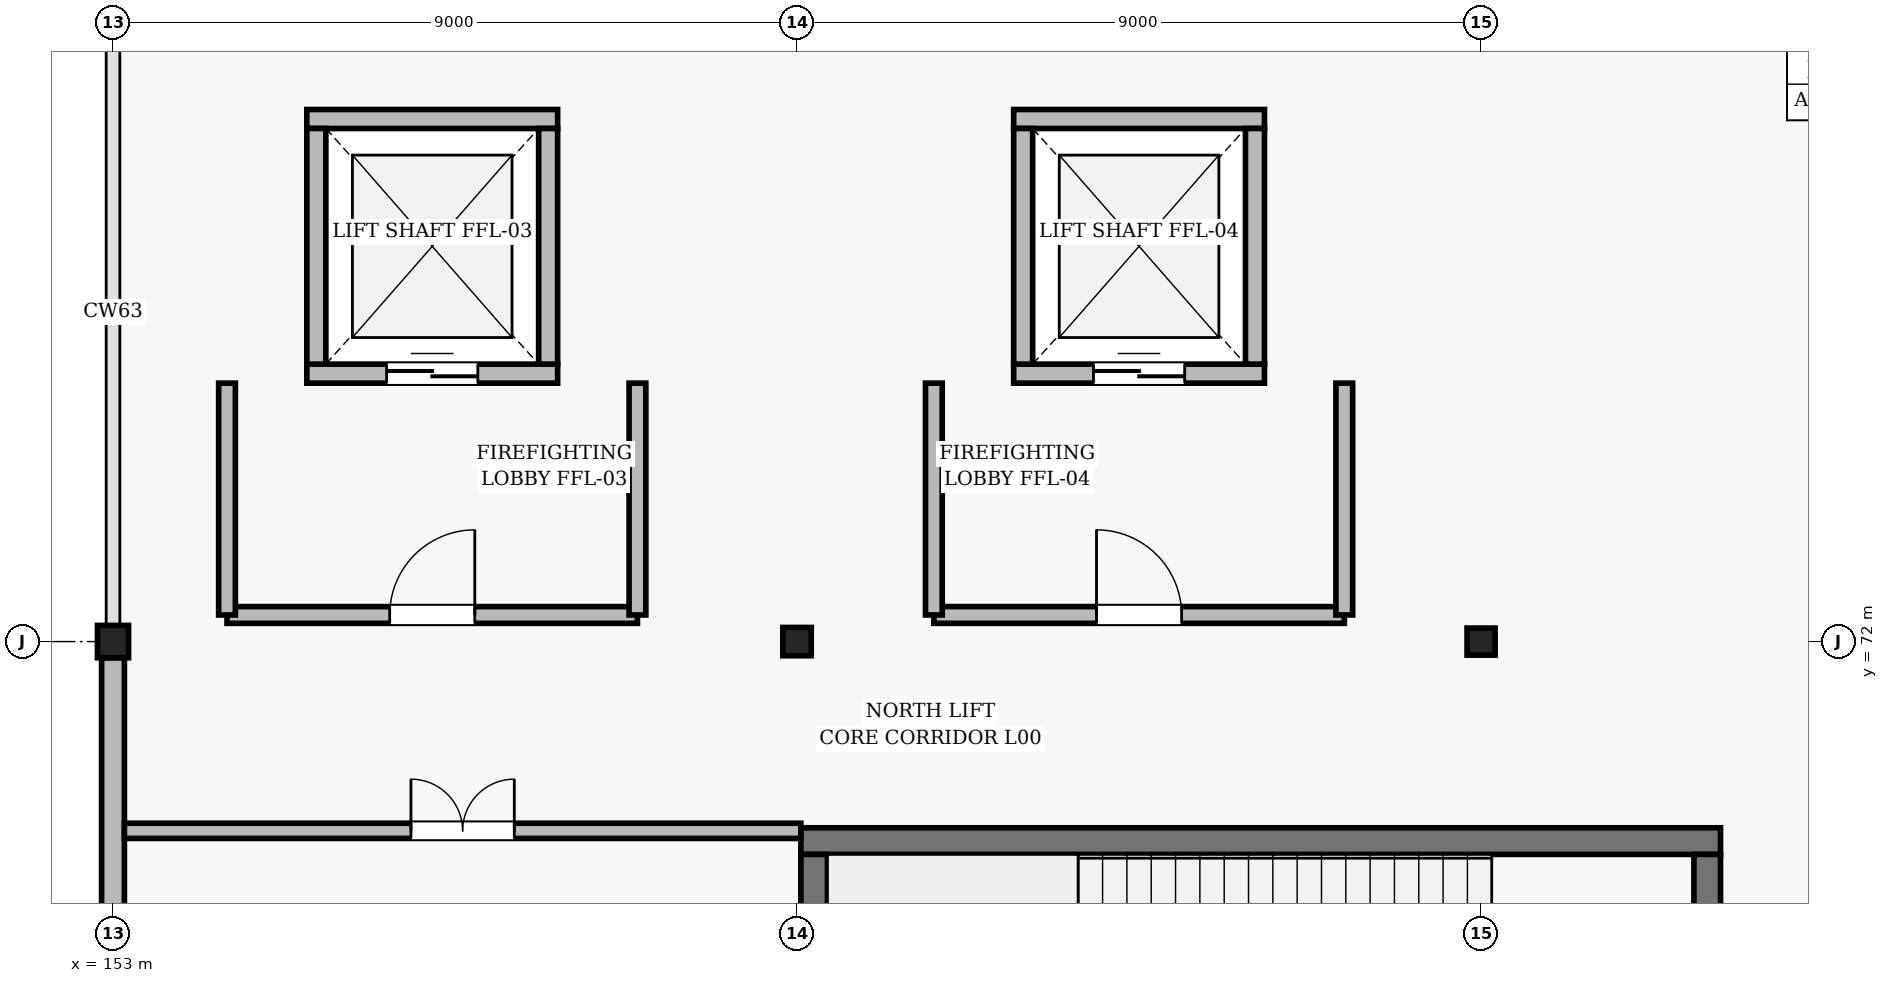
"""IFC4 building model, lengths in metres.
Left out: names, types, materials, properties, quantities, classifications, styles, units other than length and angle.
Written with IfcOpenShell. Run it as: python <this file> out.ifc"""

import sys

from ifc_helpers import new_model, si_unit, direction, frame, frame_2d, origin, origin_2d, place, context, subcontext, project, spatial, rectangle, i_section, extrude, element, fill, save


model = new_model("IFC4")
c1 = context("Model", 3, precision=1e-05, world=origin(), true_north=direction((0.0, 1.0)))
c2 = subcontext(c1, "Body", "Model", "MODEL_VIEW")
j1 = project(units=[si_unit("LENGTHUNIT", "METRE"), si_unit("PLANEANGLEUNIT", "RADIAN")], contexts=[c1])
p1 = place(None, origin())
s1 = spatial("IfcSite", under=j1, at=p1, CompositionType="ELEMENT")
p2 = place(p1, origin())
s2 = spatial("IfcBuilding", under=s1, at=p2, CompositionType="ELEMENT")
p3 = place(p2, origin())
s3 = spatial("IfcBuildingStorey", under=s2, at=p3, CompositionType="ELEMENT", Elevation=0.0)
p4 = place(p3, frame((153.0, 72.0, 0.0), z_axis=(0.0, 0.0, 1.0), x_axis=(1.0, 0.0, 0.0)))
e1 = element("IfcColumn", 1, at=p4, inside=s3, PredefinedType="COLUMN", context=c2, shape_type="SweptSolid", body=[
    extrude(i_section(OverallWidth=0.409, OverallDepth=0.425, WebThickness=0.031, FlangeThickness=0.049, FilletRadius=0.02, at=origin_2d()), origin(), (0.0, 0.0, 1.0), 5.4),
])
p5 = place(p3, frame((162.0, 72.0, 0.0), z_axis=(0.0, 0.0, 1.0), x_axis=(1.0, 0.0, 0.0)))
e2 = element("IfcColumn", 2, at=p5, inside=s3, PredefinedType="COLUMN", context=c2, shape_type="SweptSolid", body=[
    extrude(i_section(OverallWidth=0.374, OverallDepth=0.372, WebThickness=0.016, FlangeThickness=0.026, FilletRadius=0.016, at=origin_2d()), origin(), (0.0, 0.0, 1.0), 5.4),
])
p6 = place(p3, frame((171.0, 72.0, 0.0), z_axis=(0.0, 0.0, 1.0), x_axis=(1.0, 0.0, 0.0)))
e3 = element("IfcColumn", 3, at=p6, inside=s3, PredefinedType="COLUMN", context=c2, shape_type="SweptSolid", body=[
    extrude(i_section(OverallWidth=0.369, OverallDepth=0.356, WebThickness=0.011, FlangeThickness=0.018, FilletRadius=0.015, at=origin_2d()), origin(), (0.0, 0.0, 1.0), 5.4),
])
p7 = place(p3, frame((153.0, 63.347, 0.0), z_axis=(0.0, 0.0, 1.0), x_axis=(0.0, 1.0, 0.0)))
e4 = element("IfcWall", 4, at=p7, inside=s3, PredefinedType="SOLIDWALL", context=c2, shape_type="SweptSolid", body=[
    extrude(rectangle(XDim=8.44, YDim=0.3, at=frame_2d((4.22, 0.0))), origin(), (0.0, 0.0, 1.0), 4.47),
])
p8 = place(p3, frame((174.15, 69.375, 0.0), z_axis=(0.0, 0.0, 1.0), x_axis=(-1.0, 0.0, 0.0)))
e5 = element("IfcWall", 5, at=p8, inside=s3, PredefinedType="SHEAR", context=c2, shape_type="SweptSolid", body=[
    extrude(rectangle(XDim=12.1, YDim=0.35, at=frame_2d((6.05, 0.0))), origin(), (0.0, 0.0, 1.0), 5.18),
])
p9 = place(p3, frame((162.225, 69.2, 0.0), z_axis=(0.0, 0.0, 1.0), x_axis=(0.0, -1.0, 0.0)))
e6 = element("IfcWall", 6, at=p9, inside=s3, PredefinedType="SHEAR", context=c2, shape_type="SweptSolid", body=[
    extrude(rectangle(XDim=5.5, YDim=0.35, at=frame_2d((2.75, 0.0))), origin(), (0.0, 0.0, 1.0), 5.18),
])
p10 = place(p3, frame((173.975, 63.7, 0.0), z_axis=(0.0, 0.0, 1.0), x_axis=(0.0, 1.0, 0.0)))
e7 = element("IfcWall", 7, at=p10, inside=s3, PredefinedType="SHEAR", context=c2, shape_type="SweptSolid", body=[
    extrude(rectangle(XDim=5.5, YDim=0.35, at=frame_2d((2.75, 0.0))), origin(), (0.0, 0.0, 1.0), 5.18),
])
p11 = place(p10, frame((1.85, 0.0, 0.0)))
e8 = element("IfcOpeningElement", 8, at=p11, cuts=e7, PredefinedType="OPENING", context=c2, shape_type="SweptSolid", body=[
    extrude(rectangle(XDim=1.8, YDim=2.2, at=frame_2d((0.9, 1.1))), frame((0.0, 0.185, 0.0), z_axis=(0.0, -1.0, 0.0), x_axis=(1.0, 0.0, 0.0)), (0.0, 0.0, 1.0), 0.37),
])
p12 = place(p3, frame((155.55, 75.525, 0.0), z_axis=(0.0, 0.0, 1.0), x_axis=(1.0, 0.0, 0.0)))
e9 = element("IfcWall", 9, at=p12, inside=s3, PredefinedType="SOLIDWALL", context=c2, shape_type="SweptSolid", body=[
    extrude(rectangle(XDim=3.3, YDim=0.25, at=frame_2d((1.65, 0.0))), origin(), (0.0, 0.0, 1.0), 5.18),
])
p13 = place(p12, frame((1.05, 0.0, 0.0)))
e10 = element("IfcOpeningElement", 10, at=p13, cuts=e9, PredefinedType="OPENING", context=c2, shape_type="SweptSolid", body=[
    extrude(rectangle(XDim=1.2, YDim=2.25, at=frame_2d((0.6, 1.125))), frame((0.0, 0.135, 0.0), z_axis=(0.0, -1.0, 0.0), x_axis=(1.0, 0.0, 0.0)), (0.0, 0.0, 1.0), 0.27),
])
p14 = place(p3, frame((158.85, 78.875, 0.0), z_axis=(0.0, 0.0, 1.0), x_axis=(-1.0, 0.0, 0.0)))
e11 = element("IfcWall", 11, at=p14, inside=s3, PredefinedType="SOLIDWALL", context=c2, shape_type="SweptSolid", body=[
    extrude(rectangle(XDim=3.3, YDim=0.25, at=frame_2d((1.65, 0.0))), origin(), (0.0, 0.0, 1.0), 5.18),
])
for number, where, z_axis, x_axis in (
    (12, (155.675, 78.75, 0.0), (0.0, 0.0, 1.0), (0.0, -1.0, 0.0)),
    (13, (158.725, 75.65, 0.0), (0.0, 0.0, 1.0), (0.0, 1.0, 0.0)),
):
    element("IfcWall", number, at=place(p3, frame(where, z_axis=z_axis, x_axis=x_axis)), inside=s3, PredefinedType="SOLIDWALL", context=c2, shape_type="SweptSolid", body=[
        extrude(rectangle(XDim=3.1, YDim=0.25, at=frame_2d((1.55, 0.0))), origin(), (0.0, 0.0, 1.0), 5.18),
    ])
p15 = place(p3, frame((154.5, 72.35, 0.0), z_axis=(0.0, 0.0, 1.0), x_axis=(1.0, 0.0, 0.0)))
e14 = element("IfcWall", 14, at=p15, inside=s3, PredefinedType="SOLIDWALL", context=c2, shape_type="SweptSolid", body=[
    extrude(rectangle(XDim=5.4, YDim=0.22, at=frame_2d((2.7, 0.0))), origin(), (0.0, 0.0, 1.0), 4.47),
])
p16 = place(p15, frame((2.14, 0.0, 0.0)))
e15 = element("IfcOpeningElement", 15, at=p16, cuts=e14, PredefinedType="OPENING", context=c2, shape_type="SweptSolid", body=[
    extrude(rectangle(XDim=1.12, YDim=2.2, at=frame_2d((0.56, 1.1))), frame((0.0, 0.12, 0.0), z_axis=(0.0, -1.0, 0.0), x_axis=(1.0, 0.0, 0.0)), (0.0, 0.0, 1.0), 0.24),
])
for number, where, z_axis, x_axis in (
    (16, (154.5, 72.35, 0.0), (0.0, 0.0, 1.0), (0.0, 1.0, 0.0)),
    (17, (159.9, 72.35, 0.0), (0.0, 0.0, 1.0), (0.0, 1.0, 0.0)),
):
    element("IfcWall", number, at=place(p3, frame(where, z_axis=z_axis, x_axis=x_axis)), inside=s3, PredefinedType="SOLIDWALL", context=c2, shape_type="SweptSolid", body=[
        extrude(rectangle(XDim=3.05, YDim=0.22, at=frame_2d((1.525, 0.0))), origin(), (0.0, 0.0, 1.0), 4.47),
    ])
p17 = place(p3, frame((164.85, 75.525, 0.0), z_axis=(0.0, 0.0, 1.0), x_axis=(1.0, 0.0, 0.0)))
e18 = element("IfcWall", 18, at=p17, inside=s3, PredefinedType="SOLIDWALL", context=c2, shape_type="SweptSolid", body=[
    extrude(rectangle(XDim=3.3, YDim=0.25, at=frame_2d((1.65, 0.0))), origin(), (0.0, 0.0, 1.0), 5.18),
])
p18 = place(p17, frame((1.05, 0.0, 0.0)))
e19 = element("IfcOpeningElement", 19, at=p18, cuts=e18, PredefinedType="OPENING", context=c2, shape_type="SweptSolid", body=[
    extrude(rectangle(XDim=1.2, YDim=2.25, at=frame_2d((0.6, 1.125))), frame((0.0, 0.135, 0.0), z_axis=(0.0, -1.0, 0.0), x_axis=(1.0, 0.0, 0.0)), (0.0, 0.0, 1.0), 0.27),
])
p19 = place(p3, frame((168.15, 78.875, 0.0), z_axis=(0.0, 0.0, 1.0), x_axis=(-1.0, 0.0, 0.0)))
e20 = element("IfcWall", 20, at=p19, inside=s3, PredefinedType="SOLIDWALL", context=c2, shape_type="SweptSolid", body=[
    extrude(rectangle(XDim=3.3, YDim=0.25, at=frame_2d((1.65, 0.0))), origin(), (0.0, 0.0, 1.0), 5.18),
])
for number, where, z_axis, x_axis in (
    (21, (164.975, 78.75, 0.0), (0.0, 0.0, 1.0), (0.0, -1.0, 0.0)),
    (22, (168.025, 75.65, 0.0), (0.0, 0.0, 1.0), (0.0, 1.0, 0.0)),
):
    element("IfcWall", number, at=place(p3, frame(where, z_axis=z_axis, x_axis=x_axis)), inside=s3, PredefinedType="SOLIDWALL", context=c2, shape_type="SweptSolid", body=[
        extrude(rectangle(XDim=3.1, YDim=0.25, at=frame_2d((1.55, 0.0))), origin(), (0.0, 0.0, 1.0), 5.18),
    ])
p20 = place(p3, frame((163.8, 72.35, 0.0), z_axis=(0.0, 0.0, 1.0), x_axis=(1.0, 0.0, 0.0)))
e23 = element("IfcWall", 23, at=p20, inside=s3, PredefinedType="SOLIDWALL", context=c2, shape_type="SweptSolid", body=[
    extrude(rectangle(XDim=5.4, YDim=0.22, at=frame_2d((2.7, 0.0))), origin(), (0.0, 0.0, 1.0), 4.481),
])
p21 = place(p20, frame((2.14, 0.0, 0.0)))
e24 = element("IfcOpeningElement", 24, at=p21, cuts=e23, PredefinedType="OPENING", context=c2, shape_type="SweptSolid", body=[
    extrude(rectangle(XDim=1.12, YDim=2.2, at=frame_2d((0.56, 1.1))), frame((0.0, 0.12, 0.0), z_axis=(0.0, -1.0, 0.0), x_axis=(1.0, 0.0, 0.0)), (0.0, 0.0, 1.0), 0.24),
])
for number, where, z_axis, x_axis in (
    (25, (163.8, 72.35, 0.0), (0.0, 0.0, 1.0), (0.0, 1.0, 0.0)),
    (26, (169.2, 72.35, 0.0), (0.0, 0.0, 1.0), (0.0, 1.0, 0.0)),
):
    element("IfcWall", number, at=place(p3, frame(where, z_axis=z_axis, x_axis=x_axis)), inside=s3, PredefinedType="SOLIDWALL", context=c2, shape_type="SweptSolid", body=[
        extrude(rectangle(XDim=3.05, YDim=0.22, at=frame_2d((1.525, 0.0))), origin(), (0.0, 0.0, 1.0), 4.481),
    ])
p22 = place(p3, frame((153.15, 69.51, 0.0), z_axis=(0.0, 0.0, 1.0), x_axis=(1.0, 0.0, 0.0)))
e27 = element("IfcWall", 27, at=p22, inside=s3, PredefinedType="PARTITIONING", context=c2, shape_type="SweptSolid", body=[
    extrude(rectangle(XDim=8.9, YDim=0.2, at=frame_2d((4.45, 0.0))), origin(), (0.0, 0.0, 1.0), 4.47),
])
p23 = place(p22, frame((3.77, 0.0, 0.0)))
e28 = element("IfcOpeningElement", 28, at=p23, cuts=e27, PredefinedType="OPENING", context=c2, shape_type="SweptSolid", body=[
    extrude(rectangle(XDim=1.36, YDim=2.28, at=frame_2d((0.68, 1.14))), frame((0.0, 0.11, 0.0), z_axis=(0.0, -1.0, 0.0), x_axis=(1.0, 0.0, 0.0)), (0.0, 0.0, 1.0), 0.22),
])
p24 = place(p13, origin())
e29 = element("IfcDoor", 29, at=p24, inside=s3, OperationType="DOUBLE_DOOR_SLIDING", PredefinedType="DOOR", context=c2, shape_type="SweptSolid", body=[
    extrude(rectangle(XDim=1.2, YDim=2.25, at=frame_2d((0.6, 1.125))), frame((0.0, 0.025, 0.0), z_axis=(0.0, -1.0, 0.0), x_axis=(1.0, 0.0, 0.0)), (0.0, 0.0, 1.0), 0.05),
])
fill(e10, e29)
p25 = place(p16, origin())
e30 = element("IfcDoor", 30, at=p25, inside=s3, OperationType="SINGLE_SWING_RIGHT", PredefinedType="DOOR", context=c2, shape_type="SweptSolid", body=[
    extrude(rectangle(XDim=1.12, YDim=2.2, at=frame_2d((0.56, 1.1))), frame((0.0, 0.025, 0.0), z_axis=(0.0, -1.0, 0.0), x_axis=(1.0, 0.0, 0.0)), (0.0, 0.0, 1.0), 0.05),
])
fill(e15, e30)
p26 = place(p18, origin())
e31 = element("IfcDoor", 31, at=p26, inside=s3, OperationType="DOUBLE_DOOR_SLIDING", PredefinedType="DOOR", context=c2, shape_type="SweptSolid", body=[
    extrude(rectangle(XDim=1.2, YDim=2.25, at=frame_2d((0.6, 1.125))), frame((0.0, 0.025, 0.0), z_axis=(0.0, -1.0, 0.0), x_axis=(1.0, 0.0, 0.0)), (0.0, 0.0, 1.0), 0.05),
])
fill(e19, e31)
p27 = place(p21, origin())
e32 = element("IfcDoor", 32, at=p27, inside=s3, OperationType="SINGLE_SWING_LEFT", PredefinedType="DOOR", context=c2, shape_type="SweptSolid", body=[
    extrude(rectangle(XDim=1.12, YDim=2.2, at=frame_2d((0.56, 1.1))), frame((0.0, 0.025, 0.0), z_axis=(0.0, -1.0, 0.0), x_axis=(1.0, 0.0, 0.0)), (0.0, 0.0, 1.0), 0.05),
])
fill(e24, e32)
p28 = place(p23, origin())
e33 = element("IfcDoor", 33, at=p28, inside=s3, OperationType="DOUBLE_DOOR_SINGLE_SWING", PredefinedType="DOOR", context=c2, shape_type="SweptSolid", body=[
    extrude(rectangle(XDim=1.36, YDim=2.28, at=frame_2d((0.68, 1.14))), frame((0.0, 0.025, 0.0), z_axis=(0.0, -1.0, 0.0), x_axis=(1.0, 0.0, 0.0)), (0.0, 0.0, 1.0), 0.05),
])
fill(e28, e33)
save(model, sys.argv[1])
